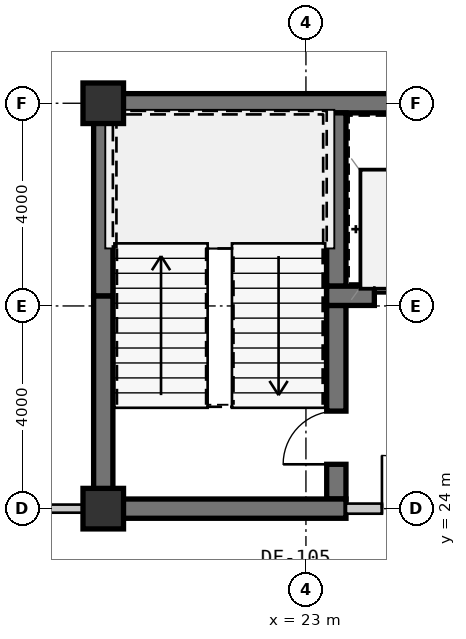
"""IFC4 building model, lengths in metres.
Left out: names, types, materials, properties, quantities, classifications, styles, units other than length and angle.
Written with IfcOpenShell. Run it as: python <this file> out.ifc"""

import sys

from ifc_helpers import new_model, si_unit, direction, frame, frame_2d, origin, origin_2d, place, context, subcontext, project, spatial, rectangle, extrude, source, transform, mapped, element, fill, save


model = new_model("IFC4")
c1 = context("Model", 3, precision=1e-05, world=origin(), true_north=direction((0.0, 1.0)))
c2 = subcontext(c1, "Body", "Model", "MODEL_VIEW")
j1 = project(units=[si_unit("LENGTHUNIT", "METRE"), si_unit("PLANEANGLEUNIT", "RADIAN")], contexts=[c1])
p1 = place(None, origin())
s1 = spatial("IfcSite", under=j1, at=p1, CompositionType="ELEMENT")
p2 = place(p1, origin())
s2 = spatial("IfcBuilding", under=s1, at=p2, CompositionType="ELEMENT")
p3 = place(p2, frame((0.0, 0.0, 45.15)))
s3 = spatial("IfcBuildingStorey", under=s2, at=p3, CompositionType="ELEMENT", Elevation=45.15)
m1 = source(origin(), c2, "Body", "SweptSolid", [
    extrude(rectangle(XDim=0.8, YDim=0.8, at=origin_2d()), origin(), (0.0, 0.0, 1.0), 3.15),
])
for number, where, z_axis, x_axis in (
    (1, (19.0, 24.0, 0.0), (0.0, 0.0, 1.0), (1.0, 0.0, 0.0)),
    (2, (19.0, 32.0, 0.0), (0.0, 0.0, 1.0), (1.0, 0.0, 0.0)),
):
    element("IfcColumn", number, at=place(p3, frame(where, z_axis=z_axis, x_axis=x_axis)), inside=s3, PredefinedType="COLUMN", context=c2, shape_type="MappedRepresentation", body=[
        mapped(m1, transform((0.0, 0.0, 0.0), scale=1.0)),
    ])
m2 = source(origin(), c2, "Body", "SweptSolid", [
    extrude(rectangle(XDim=9.19, YDim=0.38, at=frame_2d((4.595, 0.0))), origin(), (0.0, 0.0, 1.0), 2.93),
])
p4 = place(p3, frame((18.81, 32.0, 0.0), z_axis=(0.0, 0.0, 1.0), x_axis=(1.0, 0.0, 0.0)))
e3 = element("IfcWall", 3, at=p4, inside=s3, PredefinedType="SHEAR", context=c2, shape_type="MappedRepresentation", body=[
    mapped(m2, transform((0.0, 0.0, 0.0), scale=1.0)),
])
m3 = source(origin(), c2, "Body", "SweptSolid", [
    extrude(rectangle(XDim=4.01, YDim=0.38, at=frame_2d((2.005, 0.0))), origin(), (0.0, 0.0, 1.0), 2.93),
])
p5 = place(p3, frame((19.0, 24.19, 0.0), z_axis=(0.0, 0.0, 1.0), x_axis=(0.0, 1.0, 0.0)))
e4 = element("IfcWall", 4, at=p5, inside=s3, PredefinedType="SHEAR", context=c2, shape_type="MappedRepresentation", body=[
    mapped(m3, transform((0.0, 0.0, 0.0), scale=1.0)),
])
m4 = source(origin(), c2, "Body", "SweptSolid", [
    extrude(rectangle(XDim=3.61, YDim=0.38, at=frame_2d((1.805, 0.0))), origin(), (0.0, 0.0, 1.0), 2.93),
])
p6 = place(p3, frame((19.0, 28.2, 0.0), z_axis=(0.0, 0.0, 1.0), x_axis=(0.0, 1.0, 0.0)))
e5 = element("IfcWall", 5, at=p6, inside=s3, PredefinedType="SHEAR", context=c2, shape_type="MappedRepresentation", body=[
    mapped(m4, transform((0.0, 0.0, 0.0), scale=1.0)),
])
m5 = source(origin(), c2, "Body", "SweptSolid", [
    extrude(rectangle(XDim=3.42, YDim=0.38, at=frame_2d((1.71, 0.0))), origin(), (0.0, 0.0, 1.0), 2.93),
])
p7 = place(p3, frame((23.6, 28.39, 0.0), z_axis=(0.0, 0.0, 1.0), x_axis=(0.0, 1.0, 0.0)))
e6 = element("IfcWall", 6, at=p7, inside=s3, PredefinedType="SHEAR", context=c2, shape_type="MappedRepresentation", body=[
    mapped(m5, transform((0.0, 0.0, 0.0), scale=1.0)),
])
m6 = source(origin(), c2, "Body", "SweptSolid", [
    extrude(rectangle(XDim=3.82, YDim=0.38, at=frame_2d((1.91, 0.0))), origin(), (0.0, 0.0, 1.0), 2.93),
])
p8 = place(p3, frame((23.6, 24.19, 0.0), z_axis=(0.0, 0.0, 1.0), x_axis=(0.0, 1.0, 0.0)))
e7 = element("IfcWall", 7, at=p8, inside=s3, PredefinedType="SHEAR", context=c2, shape_type="MappedRepresentation", body=[
    mapped(m6, transform((0.0, 0.0, 0.0), scale=1.0)),
])
m7 = source(origin(), c2, "Body", "SweptSolid", [
    extrude(rectangle(XDim=1.05, YDim=2.1, at=frame_2d((0.525, 1.05))), frame((0.0, 0.2, 0.0), z_axis=(0.0, -1.0, 0.0), x_axis=(1.0, 0.0, 0.0)), (0.0, 0.0, 1.0), 0.4),
])
p9 = place(p8, frame((0.685, 0.0, 0.0)))
e8 = element("IfcOpeningElement", 8, at=p9, cuts=e7, PredefinedType="OPENING", context=c2, shape_type="MappedRepresentation", body=[
    mapped(m7, transform((0.0, 0.0, 0.0), scale=1.0)),
])
m8 = source(origin(), c2, "Body", "SweptSolid", [
    extrude(rectangle(XDim=4.98, YDim=0.38, at=frame_2d((2.49, 0.0))), origin(), (0.0, 0.0, 1.0), 2.93),
])
p10 = place(p3, frame((18.81, 24.0, 0.0), z_axis=(0.0, 0.0, 1.0), x_axis=(1.0, 0.0, 0.0)))
e9 = element("IfcWall", 9, at=p10, inside=s3, PredefinedType="SHEAR", context=c2, shape_type="MappedRepresentation", body=[
    mapped(m8, transform((0.0, 0.0, 0.0), scale=1.0)),
])
m9 = source(origin(), c2, "Body", "SweptSolid", [
    extrude(rectangle(XDim=2.98, YDim=0.38, at=frame_2d((1.49, 0.0))), origin(), (0.0, 0.0, 1.0), 2.93),
])
p11 = place(p3, frame((23.41, 28.2, 0.0), z_axis=(0.0, 0.0, 1.0), x_axis=(1.0, 0.0, 0.0)))
e10 = element("IfcWall", 10, at=p11, inside=s3, PredefinedType="SHEAR", context=c2, shape_type="MappedRepresentation", body=[
    mapped(m9, transform((0.0, 0.0, 0.0), scale=1.0)),
])
m10 = source(origin(), c2, "Body", "SweptSolid", [
    extrude(rectangle(XDim=1.1, YDim=2.15, at=frame_2d((0.55, 1.075))), frame((0.0, 0.2, 0.0), z_axis=(0.0, -1.0, 0.0), x_axis=(1.0, 0.0, 0.0)), (0.0, 0.0, 1.0), 0.4),
])
p12 = place(p11, frame((0.94, 0.0, 0.0)))
e11 = element("IfcOpeningElement", 11, at=p12, cuts=e10, PredefinedType="OPENING", context=c2, shape_type="MappedRepresentation", body=[
    mapped(m10, transform((0.0, 0.0, 0.0), scale=1.0)),
])
m11 = source(origin(), c2, "Body", "SweptSolid", [
    extrude(rectangle(XDim=2.66, YDim=0.2, at=frame_2d((1.33, 0.0))), origin(), (0.0, 0.0, 1.0), 2.47),
])
p13 = place(p3, frame((23.79, 24.0, 0.0), z_axis=(0.0, 0.0, 1.0), x_axis=(1.0, 0.0, 0.0)))
e12 = element("IfcWall", 12, at=p13, inside=s3, PredefinedType="SOLIDWALL", context=c2, shape_type="MappedRepresentation", body=[
    mapped(m11, transform((0.0, 0.0, 0.0), scale=1.0)),
])
m12 = source(origin(), c2, "Body", "SweptSolid", [
    extrude(rectangle(XDim=1.05, YDim=2.1, at=frame_2d((0.525, 1.05))), frame((0.0, 0.11, 0.0), z_axis=(0.0, -1.0, 0.0), x_axis=(1.0, 0.0, 0.0)), (0.0, 0.0, 1.0), 0.22),
])
p14 = place(p13, frame((0.71, 0.0, 0.0)))
e13 = element("IfcOpeningElement", 13, at=p14, cuts=e12, PredefinedType="OPENING", context=c2, shape_type="MappedRepresentation", body=[
    mapped(m12, transform((0.0, 0.0, 0.0), scale=1.0)),
])
m13 = source(origin(), c2, "Body", "SweptSolid", [
    extrude(rectangle(XDim=4.13, YDim=0.16, at=frame_2d((2.065, 0.0))), origin(), (0.0, 0.0, 1.0), 2.93),
])
p15 = place(p3, frame((14.68, 24.0, 0.0), z_axis=(0.0, 0.0, 1.0), x_axis=(1.0, 0.0, 0.0)))
e14 = element("IfcWall", 14, at=p15, inside=s3, PredefinedType="PARTITIONING", context=c2, shape_type="MappedRepresentation", body=[
    mapped(m13, transform((0.0, 0.0, 0.0), scale=1.0)),
])
m14 = source(origin(), c2, "Body", "SweptSolid", [
    extrude(rectangle(XDim=0.92, YDim=2.1, at=frame_2d((0.46, 1.05))), frame((0.0, 0.09, 0.0), z_axis=(0.0, -1.0, 0.0), x_axis=(1.0, 0.0, 0.0)), (0.0, 0.0, 1.0), 0.18),
])
p16 = place(p15, frame((1.69, 0.0, 0.0)))
e15 = element("IfcOpeningElement", 15, at=p16, cuts=e14, PredefinedType="OPENING", context=c2, shape_type="MappedRepresentation", body=[
    mapped(m14, transform((0.0, 0.0, 0.0), scale=1.0)),
])
m15 = source(origin(), c2, "Body", "SweptSolid", [
    extrude(rectangle(XDim=1.05, YDim=2.1, at=frame_2d((0.525, 1.05))), frame((0.0, 0.025, 0.0), z_axis=(0.0, -1.0, 0.0), x_axis=(1.0, 0.0, 0.0)), (0.0, 0.0, 1.0), 0.05),
])
p17 = place(p9, origin())
e16 = element("IfcDoor", 16, at=p17, inside=s3, OperationType="SINGLE_SWING_LEFT", PredefinedType="DOOR", context=c2, shape_type="MappedRepresentation", body=[
    mapped(m15, transform((0.0, 0.0, 0.0), scale=1.0)),
])
fill(e8, e16)
m16 = source(origin(), c2, "Body", "SweptSolid", [
    extrude(rectangle(XDim=1.1, YDim=2.15, at=frame_2d((0.55, 1.075))), frame((0.0, 0.025, 0.0), z_axis=(0.0, -1.0, 0.0), x_axis=(1.0, 0.0, 0.0)), (0.0, 0.0, 1.0), 0.05),
])
p18 = place(p12, origin())
e17 = element("IfcDoor", 17, at=p18, inside=s3, OperationType="SLIDING_TO_LEFT", PredefinedType="DOOR", context=c2, shape_type="MappedRepresentation", body=[
    mapped(m16, transform((0.0, 0.0, 0.0), scale=1.0)),
])
fill(e11, e17)
p19 = place(p14, origin())
e18 = element("IfcDoor", 18, at=p19, inside=s3, OperationType="SINGLE_SWING_LEFT", PredefinedType="DOOR", context=c2, shape_type="MappedRepresentation", body=[
    mapped(m15, transform((0.0, 0.0, 0.0), scale=1.0)),
])
fill(e13, e18)
save(model, sys.argv[1])
